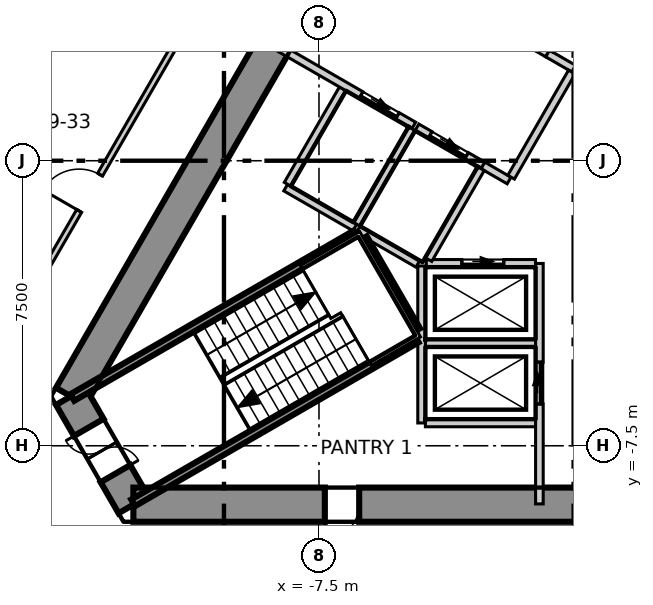
"""IFC4 building model, lengths in metres.
Left out: names, types, materials, properties, quantities, classifications, styles, units other than length and angle.
Written with IfcOpenShell. Run it as: python <this file> out.ifc"""

import sys

from ifc_helpers import new_model, si_unit, direction, frame, frame_2d, origin, place, context, subcontext, project, spatial, polyline, rectangle, outline, extrude, element, fill, save


model = new_model("IFC4")
c1 = context("Model", 3, precision=1e-05, world=origin(), true_north=direction((0.0, 1.0)))
c2 = subcontext(c1, "Body", "Model", "MODEL_VIEW")
j1 = project(units=[si_unit("LENGTHUNIT", "METRE"), si_unit("PLANEANGLEUNIT", "RADIAN")], contexts=[c1])
p1 = place(None, origin())
s1 = spatial("IfcSite", under=j1, at=p1, CompositionType="ELEMENT")
p2 = place(p1, origin())
s2 = spatial("IfcBuilding", under=s1, at=p2, CompositionType="ELEMENT")
p3 = place(p2, frame((0.0, 0.0, 47.3)))
s3 = spatial("IfcBuildingStorey", under=s2, at=p3, CompositionType="ELEMENT", Elevation=47.3)
p4 = place(p3, frame((-1.645, 15.25, -0.3), z_axis=(0.0, 0.0, 1.0), x_axis=(-0.500026485275, -0.866010111964, 0.0)))
e1 = element("IfcWall", 1, at=p4, inside=s3, PredefinedType="SHEAR", context=c2, shape_type="SweptSolid", body=[
    extrude(outline(polyline([(-0.26, -0.45), (1.685, -0.45), (3.63, -0.45), (5.576, -0.45), (7.521, -0.45), (9.466, -0.449), (11.411, -0.449), (13.357, -0.449), (15.302, -0.449), (17.247, -0.449), (19.192, -0.449), (21.138, -0.449), (23.083, -0.449), (25.028, -0.449), (24.509, 0.45), (22.644, 0.45), (20.778, 0.45), (18.913, 0.45), (17.048, 0.45), (15.182, 0.449), (13.317, 0.449), (11.452, 0.449), (9.587, 0.449), (7.721, 0.449), (5.856, 0.449), (3.991, 0.449), (2.125, 0.449), (0.26, 0.449), (-0.26, -0.45)])), origin(), (0.0, 0.0, 1.0), 4.0),
])
p5 = place(p4, frame((11.834, 0.0, 0.3)))
e2 = element("IfcOpeningElement", 2, at=p5, cuts=e1, PredefinedType="OPENING", context=c2, shape_type="SweptSolid", body=[
    extrude(rectangle(XDim=1.1, YDim=2.1, at=frame_2d((0.55, 1.05))), frame((0.0, 0.46, 0.0), z_axis=(0.0, -1.0, 0.0), x_axis=(1.0, 0.0, 0.0)), (0.0, 0.0, 1.0), 0.92),
])
p6 = place(p4, frame((6.671, 0.0, 0.3)))
e3 = element("IfcOpeningElement", 3, at=p6, cuts=e1, PredefinedType="OPENING", context=c2, shape_type="SweptSolid", body=[
    extrude(rectangle(XDim=1.0, YDim=2.1, at=frame_2d((0.5, 1.05))), frame((0.0, 0.46, 0.0), z_axis=(0.0, -1.0, 0.0), x_axis=(1.0, 0.0, 0.0)), (0.0, 0.0, 1.0), 0.92),
])
p7 = place(p3, frame((-14.03, -6.2, -0.3), z_axis=(0.0, 0.0, 1.0), x_axis=(0.500111984565, -0.865960739811, 0.0)))
e4 = element("IfcWall", 4, at=p7, inside=s3, PredefinedType="SHEAR", context=c2, shape_type="SweptSolid", body=[
    extrude(outline(polyline([(-0.26, -0.449), (1.646, -0.449), (3.551, -0.45), (3.032, 0.45), (1.646, 0.45), (0.26, 0.45), (-0.26, -0.449)])), origin(), (0.0, 0.0, 1.0), 4.0),
])
p8 = place(p7, frame((0.946, 0.0, 0.3)))
e5 = element("IfcOpeningElement", 5, at=p8, cuts=e4, PredefinedType="OPENING", context=c2, shape_type="SweptSolid", body=[
    extrude(rectangle(XDim=1.4, YDim=2.1, at=frame_2d((0.7, 1.05))), frame((0.0, 0.46, 0.0), z_axis=(0.0, -1.0, 0.0), x_axis=(1.0, 0.0, 0.0)), (0.0, 0.0, 1.0), 0.92),
])
p9 = place(p3, frame((-12.384, -9.05, -0.3), z_axis=(0.0, 0.0, 1.0), x_axis=(1.0, 0.0, 0.0)))
e6 = element("IfcWall", 6, at=p9, inside=s3, PredefinedType="SHEAR", context=c2, shape_type="SweptSolid", body=[
    extrude(outline(polyline([(-0.26, -0.45), (1.685, -0.45), (3.63, -0.45), (5.576, -0.45), (7.521, -0.45), (9.466, -0.45), (11.411, -0.45), (13.357, -0.45), (15.302, -0.45), (17.247, -0.45), (19.192, -0.45), (21.138, -0.45), (23.083, -0.45), (25.028, -0.45), (24.508, 0.45), (22.643, 0.45), (20.778, 0.45), (18.912, 0.45), (17.047, 0.45), (15.182, 0.45), (13.317, 0.45), (11.451, 0.45), (9.586, 0.45), (7.721, 0.45), (5.856, 0.45), (3.99, 0.45), (2.125, 0.45), (0.26, 0.45), (-0.26, -0.45)])), origin(), (0.0, 0.0, 1.0), 4.0),
])
p10 = place(p9, frame((5.04, 0.0, 0.3)))
e7 = element("IfcOpeningElement", 7, at=p10, cuts=e6, PredefinedType="OPENING", context=c2, shape_type="SweptSolid", body=[
    extrude(rectangle(XDim=0.9, YDim=2.1, at=frame_2d((0.45, 1.05))), frame((0.0, 0.46, 0.0), z_axis=(0.0, -1.0, 0.0), x_axis=(1.0, 0.0, 0.0)), (0.0, 0.0, 1.0), 0.92),
])
p11 = place(p9, frame((17.425, 0.0, 0.3)))
e8 = element("IfcOpeningElement", 8, at=p11, cuts=e6, PredefinedType="OPENING", context=c2, shape_type="SweptSolid", body=[
    extrude(rectangle(XDim=0.9, YDim=2.1, at=frame_2d((0.45, 1.05))), frame((0.0, 0.46, 0.0), z_axis=(0.0, -1.0, 0.0), x_axis=(1.0, 0.0, 0.0)), (0.0, 0.0, 1.0), 0.92),
])
p12 = place(p3, frame((-3.417, 38.096, 0.0), z_axis=(0.0, 0.0, 1.0), x_axis=(-0.500000412988, -0.866025165346, 0.0)))
e9 = element("IfcWall", 9, at=p12, inside=s3, PredefinedType="ELEMENTEDWALL", context=c2, shape_type="SweptSolid", body=[
    extrude(rectangle(XDim=62.548, YDim=0.2, at=frame_2d((31.274, 0.0))), origin(), (0.0, 0.0, 1.0), 3.7),
])
p13 = place(p12, frame((2.25, 0.0, 0.9)))
e10 = element("IfcOpeningElement", 10, at=p13, cuts=e9, PredefinedType="OPENING", context=c2, shape_type="SweptSolid", body=[
    extrude(rectangle(XDim=5.6, YDim=2.5, at=frame_2d((2.8, 1.25))), frame((0.0, 0.11, 0.0), z_axis=(0.0, -1.0, 0.0), x_axis=(1.0, 0.0, 0.0)), (0.0, 0.0, 1.0), 0.22),
])
p14 = place(p12, frame((9.745, 0.0, 0.9)))
e11 = element("IfcOpeningElement", 11, at=p14, cuts=e9, PredefinedType="OPENING", context=c2, shape_type="SweptSolid", body=[
    extrude(rectangle(XDim=5.6, YDim=2.5, at=frame_2d((2.8, 1.25))), frame((0.0, 0.11, 0.0), z_axis=(0.0, -1.0, 0.0), x_axis=(1.0, 0.0, 0.0)), (0.0, 0.0, 1.0), 0.22),
])
p15 = place(p12, frame((17.241, 0.0, 0.9)))
e12 = element("IfcOpeningElement", 12, at=p15, cuts=e9, PredefinedType="OPENING", context=c2, shape_type="SweptSolid", body=[
    extrude(rectangle(XDim=5.6, YDim=2.5, at=frame_2d((2.8, 1.25))), frame((0.0, 0.11, 0.0), z_axis=(0.0, -1.0, 0.0), x_axis=(1.0, 0.0, 0.0)), (0.0, 0.0, 1.0), 0.22),
])
p16 = place(p12, frame((24.736, 0.0, 0.9)))
e13 = element("IfcOpeningElement", 13, at=p16, cuts=e9, PredefinedType="OPENING", context=c2, shape_type="SweptSolid", body=[
    extrude(rectangle(XDim=5.6, YDim=2.5, at=frame_2d((2.8, 1.25))), frame((0.0, 0.11, 0.0), z_axis=(0.0, -1.0, 0.0), x_axis=(1.0, 0.0, 0.0)), (0.0, 0.0, 1.0), 0.22),
])
p17 = place(p12, frame((32.231, 0.0, 0.9)))
e14 = element("IfcOpeningElement", 14, at=p17, cuts=e9, PredefinedType="OPENING", context=c2, shape_type="SweptSolid", body=[
    extrude(rectangle(XDim=5.6, YDim=2.5, at=frame_2d((2.8, 1.25))), frame((0.0, 0.11, 0.0), z_axis=(0.0, -1.0, 0.0), x_axis=(1.0, 0.0, 0.0)), (0.0, 0.0, 1.0), 0.22),
])
p18 = place(p12, frame((39.727, 0.0, 0.9)))
e15 = element("IfcOpeningElement", 15, at=p18, cuts=e9, PredefinedType="OPENING", context=c2, shape_type="SweptSolid", body=[
    extrude(rectangle(XDim=5.6, YDim=2.5, at=frame_2d((2.8, 1.25))), frame((0.0, 0.11, 0.0), z_axis=(0.0, -1.0, 0.0), x_axis=(1.0, 0.0, 0.0)), (0.0, 0.0, 1.0), 0.22),
])
p19 = place(p12, frame((47.222, 0.0, 0.9)))
e16 = element("IfcOpeningElement", 16, at=p19, cuts=e9, PredefinedType="OPENING", context=c2, shape_type="SweptSolid", body=[
    extrude(rectangle(XDim=5.6, YDim=2.5, at=frame_2d((2.8, 1.25))), frame((0.0, 0.11, 0.0), z_axis=(0.0, -1.0, 0.0), x_axis=(1.0, 0.0, 0.0)), (0.0, 0.0, 1.0), 0.22),
])
p20 = place(p12, frame((54.717, 0.0, 0.9)))
e17 = element("IfcOpeningElement", 17, at=p20, cuts=e9, PredefinedType="OPENING", context=c2, shape_type="SweptSolid", body=[
    extrude(rectangle(XDim=5.6, YDim=2.5, at=frame_2d((2.8, 1.25))), frame((0.0, 0.11, 0.0), z_axis=(0.0, -1.0, 0.0), x_axis=(1.0, 0.0, 0.0)), (0.0, 0.0, 1.0), 0.22),
])
p21 = place(p3, frame((-19.497, -11.17, 0.0), z_axis=(0.0, 0.0, 1.0), x_axis=(0.499998854553, 0.866026065108, 0.0)))
e18 = element("IfcWall", 18, at=p21, inside=s3, PredefinedType="PARTITIONING", context=c2, shape_type="SweptSolid", body=[
    extrude(rectangle(XDim=38.994, YDim=0.15, at=frame_2d((19.497, 0.0))), origin(), (0.0, 0.0, 1.0), 3.7),
])
p22 = place(p21, frame((36.144, 0.0, 0.0)))
e19 = element("IfcOpeningElement", 19, at=p22, cuts=e18, PredefinedType="OPENING", context=c2, shape_type="SweptSolid", body=[
    extrude(rectangle(XDim=1.1, YDim=2.1, at=frame_2d((0.55, 1.05))), frame((0.0, 0.085, 0.0), z_axis=(0.0, -1.0, 0.0), x_axis=(1.0, 0.0, 0.0)), (0.0, 0.0, 1.0), 0.17),
])
p23 = place(p21, frame((21.963, 0.0, 0.0)))
e20 = element("IfcOpeningElement", 20, at=p23, cuts=e18, PredefinedType="OPENING", context=c2, shape_type="SweptSolid", body=[
    extrude(rectangle(XDim=1.1, YDim=2.1, at=frame_2d((0.55, 1.05))), frame((0.0, 0.085, 0.0), z_axis=(0.0, -1.0, 0.0), x_axis=(1.0, 0.0, 0.0)), (0.0, 0.0, 1.0), 0.17),
])
p24 = place(p21, frame((32.363, 0.0, 0.0)))
e21 = element("IfcOpeningElement", 21, at=p24, cuts=e18, PredefinedType="OPENING", context=c2, shape_type="SweptSolid", body=[
    extrude(rectangle(XDim=0.9, YDim=2.1, at=frame_2d((0.45, 1.05))), frame((0.0, 0.085, 0.0), z_axis=(0.0, -1.0, 0.0), x_axis=(1.0, 0.0, 0.0)), (0.0, 0.0, 1.0), 0.17),
])
p25 = place(p21, frame((29.163, 0.0, 0.0)))
e22 = element("IfcOpeningElement", 22, at=p25, cuts=e18, PredefinedType="OPENING", context=c2, shape_type="SweptSolid", body=[
    extrude(rectangle(XDim=0.9, YDim=2.1, at=frame_2d((0.45, 1.05))), frame((0.0, 0.085, 0.0), z_axis=(0.0, -1.0, 0.0), x_axis=(1.0, 0.0, 0.0)), (0.0, 0.0, 1.0), 0.17),
])
p26 = place(p21, frame((26.263, 0.0, 0.0)))
e23 = element("IfcOpeningElement", 23, at=p26, cuts=e18, PredefinedType="OPENING", context=c2, shape_type="SweptSolid", body=[
    extrude(rectangle(XDim=1.0, YDim=2.1, at=frame_2d((0.5, 1.05))), frame((0.0, 0.085, 0.0), z_axis=(0.0, -1.0, 0.0), x_axis=(1.0, 0.0, 0.0)), (0.0, 0.0, 1.0), 0.17),
])
p27 = place(p21, frame((11.373, 0.0, 0.0)))
e24 = element("IfcOpeningElement", 24, at=p27, cuts=e18, PredefinedType="OPENING", context=c2, shape_type="SweptSolid", body=[
    extrude(rectangle(XDim=1.1, YDim=2.1, at=frame_2d((0.55, 1.05))), frame((0.0, 0.085, 0.0), z_axis=(0.0, -1.0, 0.0), x_axis=(1.0, 0.0, 0.0)), (0.0, 0.0, 1.0), 0.17),
])
p28 = place(p21, frame((1.581, 0.0, 0.0)))
e25 = element("IfcOpeningElement", 25, at=p28, cuts=e18, PredefinedType="OPENING", context=c2, shape_type="SweptSolid", body=[
    extrude(rectangle(XDim=1.1, YDim=2.1, at=frame_2d((0.55, 1.05))), frame((0.0, 0.085, 0.0), z_axis=(0.0, -1.0, 0.0), x_axis=(1.0, 0.0, 0.0)), (0.0, 0.0, 1.0), 0.17),
])
p29 = place(p3, frame((-20.362, -5.468, 0.0), z_axis=(0.0, 0.0, 1.0), x_axis=(0.49999393442, 0.866028905721, 0.0)))
e26 = element("IfcWall", 26, at=p29, inside=s3, PredefinedType="PARTITIONING", context=c2, shape_type="SweptSolid", body=[
    extrude(rectangle(XDim=14.843, YDim=0.15, at=frame_2d((7.421, 0.0))), origin(), (0.0, 0.0, 1.0), 3.7),
])
p30 = place(p29, frame((6.967, 0.0, 0.0)))
e27 = element("IfcOpeningElement", 27, at=p30, cuts=e26, PredefinedType="OPENING", context=c2, shape_type="SweptSolid", body=[
    extrude(rectangle(XDim=1.0, YDim=2.1, at=frame_2d((0.5, 1.05))), frame((0.0, 0.085, 0.0), z_axis=(0.0, -1.0, 0.0), x_axis=(1.0, 0.0, 0.0)), (0.0, 0.0, 1.0), 0.17),
])
p31 = place(p3, frame((-8.376, -0.707, 0.0), z_axis=(0.0, 0.0, 1.0), x_axis=(0.866067520717, -0.499927044236, 0.0)))
e28 = element("IfcWall", 28, at=p31, inside=s3, PredefinedType="SOLIDWALL", context=c2, shape_type="SweptSolid", body=[
    extrude(rectangle(XDim=2.1, YDim=0.2, at=frame_2d((1.05, 0.0))), origin(), (0.0, 0.0, 1.0), 3.7),
])
p32 = place(p3, frame((-8.326, -0.62, 0.0), z_axis=(0.0, 0.0, 1.0), x_axis=(0.500023687443, 0.866011727401, 0.0)))
e29 = element("IfcWall", 29, at=p32, inside=s3, PredefinedType="SOLIDWALL", context=c2, shape_type="SweptSolid", body=[
    extrude(rectangle(XDim=2.9, YDim=0.2, at=frame_2d((1.45, 0.0))), origin(), (0.0, 0.0, 1.0), 3.7),
])
p33 = place(p3, frame((-4.7, -4.8, 0.0), z_axis=(0.0, 0.0, 1.0), x_axis=(1.0, 0.0, 0.0)))
e30 = element("IfcWall", 30, at=p33, inside=s3, PredefinedType="SOLIDWALL", context=c2, shape_type="SweptSolid", body=[
    extrude(rectangle(XDim=2.9, YDim=0.2, at=frame_2d((1.45, 0.0))), origin(), (0.0, 0.0, 1.0), 3.7),
])
p34 = place(p3, frame((-4.8, -6.9, 0.0), z_axis=(0.0, 0.0, 1.0), x_axis=(0.0, 1.0, 0.0)))
e31 = element("IfcWall", 31, at=p34, inside=s3, PredefinedType="SOLIDWALL", context=c2, shape_type="SweptSolid", body=[
    extrude(rectangle(XDim=4.131, YDim=0.2, at=frame_2d((2.065, 0.0))), origin(), (0.0, 0.0, 1.0), 3.7),
])
p35 = place(p3, frame((-4.7, -6.9, 0.0), z_axis=(0.0, 0.0, 1.0), x_axis=(1.0, 0.0, 0.0)))
e32 = element("IfcWall", 32, at=p35, inside=s3, PredefinedType="SOLIDWALL", context=c2, shape_type="SweptSolid", body=[
    extrude(rectangle(XDim=2.9, YDim=0.2, at=frame_2d((1.45, 0.0))), origin(), (0.0, 0.0, 1.0), 3.7),
])
p36 = place(p3, frame((-1.7, -9.03, 0.0), z_axis=(0.0, 0.0, 1.0), x_axis=(0.0, 1.0, 0.0)))
e33 = element("IfcWall", 33, at=p36, inside=s3, PredefinedType="SOLIDWALL", context=c2, shape_type="SweptSolid", body=[
    extrude(rectangle(XDim=6.327, YDim=0.2, at=frame_2d((3.164, 0.0))), origin(), (0.0, 0.0, 1.0), 3.7),
])
p37 = place(p36, frame((2.63, 0.0, 0.0)))
e34 = element("IfcOpeningElement", 34, at=p37, cuts=e33, PredefinedType="OPENING", context=c2, shape_type="SweptSolid", body=[
    extrude(rectangle(XDim=1.1, YDim=2.1, at=frame_2d((0.55, 1.05))), frame((0.0, 0.11, 0.0), z_axis=(0.0, -1.0, 0.0), x_axis=(1.0, 0.0, 0.0)), (0.0, 0.0, 1.0), 0.22),
])
p38 = place(p3, frame((-4.676, -2.7, 0.0), z_axis=(0.0, 0.0, 1.0), x_axis=(1.0, 0.0, 0.0)))
e35 = element("IfcWall", 35, at=p38, inside=s3, PredefinedType="SOLIDWALL", context=c2, shape_type="SweptSolid", body=[
    extrude(rectangle(XDim=2.873, YDim=0.2, at=frame_2d((1.437, 0.0))), origin(), (0.0, 0.0, 1.0), 3.7),
])
p39 = place(p38, frame((0.937, 0.0, 0.0)))
e36 = element("IfcOpeningElement", 36, at=p39, cuts=e35, PredefinedType="OPENING", context=c2, shape_type="SweptSolid", body=[
    extrude(rectangle(XDim=1.1, YDim=2.1, at=frame_2d((0.55, 1.05))), frame((0.0, 0.11, 0.0), z_axis=(0.0, -1.0, 0.0), x_axis=(1.0, 0.0, 0.0)), (0.0, 0.0, 1.0), 0.22),
])
p40 = place(p3, frame((-8.67, 3.043, 0.0), z_axis=(0.0, 0.0, 1.0), x_axis=(0.866029956157, -0.499992114976, 0.0)))
e37 = element("IfcWall", 37, at=p40, inside=s3, PredefinedType="SOLIDWALL", context=c2, shape_type="SweptSolid", body=[
    extrude(rectangle(XDim=4.232, YDim=0.2, at=frame_2d((2.116, 0.0))), origin(), (0.0, 0.0, 1.0), 3.7),
])
p41 = place(p40, frame((2.63, 0.0, 0.0)))
e38 = element("IfcOpeningElement", 38, at=p41, cuts=e37, PredefinedType="OPENING", context=c2, shape_type="SweptSolid", body=[
    extrude(rectangle(XDim=1.1, YDim=2.1, at=frame_2d((0.55, 1.05))), frame((0.0, 0.11, 0.0), z_axis=(0.0, -1.0, 0.0), x_axis=(1.0, 0.0, 0.0)), (0.0, 0.0, 1.0), 0.22),
])
p42 = place(p3, frame((-3.188, -0.122, 0.0), z_axis=(0.0, 0.0, 1.0), x_axis=(0.865705793592, -0.50055317294, 0.0)))
e39 = element("IfcWall", 39, at=p42, inside=s3, PredefinedType="SOLIDWALL", context=c2, shape_type="SweptSolid", body=[
    extrude(rectangle(XDim=0.797, YDim=0.2, at=frame_2d((0.398, 0.0))), origin(), (0.0, 0.0, 1.0), 3.7),
])
p43 = place(p3, frame((-1.488, 2.822, 0.0), z_axis=(0.0, 0.0, 1.0), x_axis=(0.866236612152, -0.499633997809, 0.0)))
e40 = element("IfcWall", 40, at=p43, inside=s3, PredefinedType="SOLIDWALL", context=c2, shape_type="SweptSolid", body=[
    extrude(rectangle(XDim=0.796, YDim=0.2, at=frame_2d((0.398, 0.0))), origin(), (0.0, 0.0, 1.0), 3.7),
])
p44 = place(p3, frame((-2.444, -0.433, 0.0), z_axis=(0.0, 0.0, 1.0), x_axis=(0.500035624827, 0.866004834804, 0.0)))
e41 = element("IfcWall", 41, at=p44, inside=s3, PredefinedType="SOLIDWALL", context=c2, shape_type="SweptSolid", body=[
    extrude(rectangle(XDim=3.194, YDim=0.2, at=frame_2d((1.597, 0.0))), origin(), (0.0, 0.0, 1.0), 3.7),
])
p45 = place(p3, frame((-6.507, -1.67, 0.0), z_axis=(0.0, 0.0, 1.0), x_axis=(0.50012328804, 0.865954211699, 0.0)))
e42 = element("IfcWall", 42, at=p45, inside=s3, PredefinedType="SOLIDWALL", context=c2, shape_type="SweptSolid", body=[
    extrude(rectangle(XDim=2.9, YDim=0.2, at=frame_2d((1.45, 0.0))), origin(), (0.0, 0.0, 1.0), 3.7),
])
p46 = place(p3, frame((-6.47, -1.807, 0.0), z_axis=(0.0, 0.0, 1.0), x_axis=(0.865883195159, -0.500246231712, 0.0)))
e43 = element("IfcWall", 43, at=p46, inside=s3, PredefinedType="SOLIDWALL", context=c2, shape_type="SweptSolid", body=[
    extrude(rectangle(XDim=1.815, YDim=0.2, at=frame_2d((0.908, 0.0))), origin(), (0.0, 0.0, 1.0), 3.7),
])
p47 = place(p3, frame((-4.922, 0.879, 0.0), z_axis=(0.0, 0.0, 1.0), x_axis=(0.866073918653, -0.499915960366, 0.0)))
e44 = element("IfcWall", 44, at=p47, inside=s3, PredefinedType="SOLIDWALL", context=c2, shape_type="SweptSolid", body=[
    extrude(rectangle(XDim=2.002, YDim=0.2, at=frame_2d((1.001, 0.0))), origin(), (0.0, 0.0, 1.0), 3.7),
])
p48 = place(p47, frame((0.402, 0.0, 0.0)))
e45 = element("IfcOpeningElement", 45, at=p48, cuts=e44, PredefinedType="OPENING", context=c2, shape_type="SweptSolid", body=[
    extrude(rectangle(XDim=1.1, YDim=2.1, at=frame_2d((0.55, 1.05))), frame((0.0, 0.11, 0.0), z_axis=(0.0, -1.0, 0.0), x_axis=(1.0, 0.0, 0.0)), (0.0, 0.0, 1.0), 0.22),
])
p49 = place(p3, frame((-4.619, -2.6, 0.0), z_axis=(0.0, 0.0, 1.0), x_axis=(0.50009492287, 0.865970593103, 0.0)))
e46 = element("IfcWall", 46, at=p49, inside=s3, PredefinedType="SOLIDWALL", context=c2, shape_type="SweptSolid", body=[
    extrude(rectangle(XDim=2.761, YDim=0.2, at=frame_2d((1.381, 0.0))), origin(), (0.0, 0.0, 1.0), 3.7),
])
p50 = place(p3, frame((-3.309, 3.873, 0.0), z_axis=(0.0, 0.0, 1.0), x_axis=(0.866098583652, -0.499873227325, 0.0)))
e47 = element("IfcWall", 47, at=p50, inside=s3, PredefinedType="SOLIDWALL", context=c2, shape_type="SweptSolid", body=[
    extrude(rectangle(XDim=2.103, YDim=0.2, at=frame_2d((1.051, 0.0))), origin(), (0.0, 0.0, 1.0), 3.7),
])
p51 = place(p50, frame((0.502, 0.0, 0.0)))
e48 = element("IfcOpeningElement", 48, at=p51, cuts=e47, PredefinedType="OPENING", context=c2, shape_type="SweptSolid", body=[
    extrude(rectangle(XDim=1.1, YDim=2.1, at=frame_2d((0.55, 1.05))), frame((0.0, 0.11, 0.0), z_axis=(0.0, -1.0, 0.0), x_axis=(1.0, 0.0, 0.0)), (0.0, 0.0, 1.0), 0.22),
])
p52 = place(p3, frame((-13.99, -6.229, 0.0), z_axis=(0.0, 0.0, 1.0), x_axis=(0.866060059011, 0.499939970583, 0.0)))
e49 = element("IfcWall", 49, at=p52, inside=s3, PredefinedType="SOLIDWALL", context=c2, shape_type="SweptSolid", body=[
    extrude(rectangle(XDim=8.615, YDim=0.2, at=frame_2d((4.307, 0.0))), origin(), (0.0, 0.0, 1.0), 3.7),
])
p53 = place(p3, frame((-6.329, -2.038, 0.0), z_axis=(0.0, 0.0, 1.0), x_axis=(0.500200581029, -0.865909567298, 0.0)))
e50 = element("IfcWall", 50, at=p53, inside=s3, PredefinedType="SOLIDWALL", context=c2, shape_type="SweptSolid", body=[
    extrude(rectangle(XDim=2.799, YDim=0.2, at=frame_2d((1.399, 0.0))), origin(), (0.0, 0.0, 1.0), 3.7),
])
p54 = place(p3, frame((-12.39, -9.001, 0.0), z_axis=(0.0, 0.0, 1.0), x_axis=(0.866010975815, 0.500024989144, 0.0)))
e51 = element("IfcWall", 51, at=p54, inside=s3, PredefinedType="SOLIDWALL", context=c2, shape_type="SweptSolid", body=[
    extrude(rectangle(XDim=8.615, YDim=0.2, at=frame_2d((4.308, 0.0))), origin(), (0.0, 0.0, 1.0), 3.7),
])
p55 = place(p39, origin())
e52 = element("IfcDoor", 52, at=p55, inside=s3, OperationType="SLIDING_TO_LEFT", PredefinedType="DOOR", context=c2, shape_type="SweptSolid", body=[
    extrude(rectangle(XDim=1.1, YDim=2.1, at=frame_2d((0.55, 1.05))), frame((0.0, 0.025, 0.0), z_axis=(0.0, -1.0, 0.0), x_axis=(1.0, 0.0, 0.0)), (0.0, 0.0, 1.0), 0.05),
])
fill(e36, e52)
p56 = place(p37, origin())
e53 = element("IfcDoor", 53, at=p56, inside=s3, OperationType="SLIDING_TO_LEFT", PredefinedType="DOOR", context=c2, shape_type="SweptSolid", body=[
    extrude(rectangle(XDim=1.1, YDim=2.1, at=frame_2d((0.55, 1.05))), frame((0.0, 0.025, 0.0), z_axis=(0.0, -1.0, 0.0), x_axis=(1.0, 0.0, 0.0)), (0.0, 0.0, 1.0), 0.05),
])
fill(e34, e53)
p57 = place(p48, origin())
e54 = element("IfcDoor", 54, at=p57, inside=s3, OperationType="SLIDING_TO_LEFT", PredefinedType="DOOR", context=c2, shape_type="SweptSolid", body=[
    extrude(rectangle(XDim=1.1, YDim=2.1, at=frame_2d((0.55, 1.05))), frame((0.0, 0.025, 0.0), z_axis=(0.0, -1.0, 0.0), x_axis=(1.0, 0.0, 0.0)), (0.0, 0.0, 1.0), 0.05),
])
fill(e45, e54)
p58 = place(p41, origin())
e55 = element("IfcDoor", 55, at=p58, inside=s3, OperationType="SLIDING_TO_LEFT", PredefinedType="DOOR", context=c2, shape_type="SweptSolid", body=[
    extrude(rectangle(XDim=1.1, YDim=2.1, at=frame_2d((0.55, 1.05))), frame((0.0, 0.025, 0.0), z_axis=(0.0, -1.0, 0.0), x_axis=(1.0, 0.0, 0.0)), (0.0, 0.0, 1.0), 0.05),
])
fill(e38, e55)
p59 = place(p27, origin())
e56 = element("IfcDoor", 56, at=p59, inside=s3, OperationType="SINGLE_SWING_RIGHT", PredefinedType="DOOR", context=c2, shape_type="SweptSolid", body=[
    extrude(rectangle(XDim=1.1, YDim=2.1, at=frame_2d((0.55, 1.05))), frame((0.0, 0.025, 0.0), z_axis=(0.0, -1.0, 0.0), x_axis=(1.0, 0.0, 0.0)), (0.0, 0.0, 1.0), 0.05),
])
fill(e24, e56)
p60 = place(p8, origin())
e57 = element("IfcDoor", 57, at=p60, inside=s3, OperationType="DOUBLE_DOOR_SINGLE_SWING", PredefinedType="DOOR", context=c2, shape_type="SweptSolid", body=[
    extrude(rectangle(XDim=1.4, YDim=2.1, at=frame_2d((0.7, 1.05))), frame((0.0, 0.025, 0.0), z_axis=(0.0, -1.0, 0.0), x_axis=(1.0, 0.0, 0.0)), (0.0, 0.0, 1.0), 0.05),
])
fill(e5, e57)
p61 = place(p10, origin())
e58 = element("IfcDoor", 58, at=p61, inside=s3, OperationType="SINGLE_SWING_LEFT", PredefinedType="DOOR", context=c2, shape_type="SweptSolid", body=[
    extrude(rectangle(XDim=0.9, YDim=2.1, at=frame_2d((0.45, 1.05))), frame((0.0, 0.025, 0.0), z_axis=(0.0, -1.0, 0.0), x_axis=(1.0, 0.0, 0.0)), (0.0, 0.0, 1.0), 0.05),
])
fill(e7, e58)
save(model, sys.argv[1])
